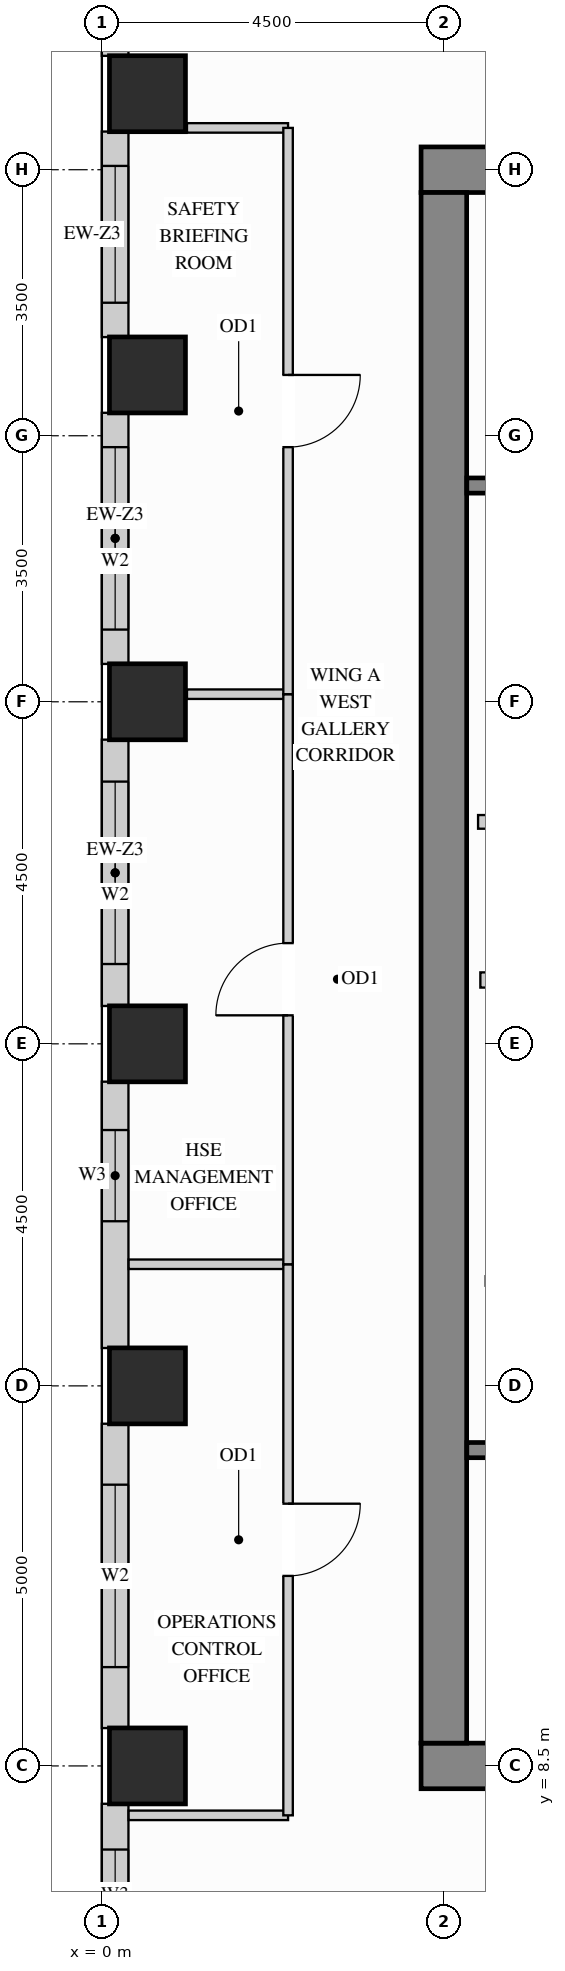
"""IFC4 building model, lengths in metres.
Left out: names, types, materials, properties, quantities, classifications, styles, units other than length and angle.
Written with IfcOpenShell. Run it as: python <this file> out.ifc"""

import sys

from ifc_helpers import new_model, si_unit, direction, frame, frame_2d, origin, origin_2d, place, context, subcontext, project, spatial, rectangle, extrude, source, transform, mapped, element, fill, save


model = new_model("IFC4")
c1 = context("Model", 3, precision=1e-05, world=origin(), true_north=direction((0.0, 1.0)))
c2 = subcontext(c1, "Body", "Model", "MODEL_VIEW")
j1 = project(units=[si_unit("LENGTHUNIT", "METRE"), si_unit("PLANEANGLEUNIT", "RADIAN")], contexts=[c1])
p1 = place(None, origin())
s1 = spatial("IfcSite", under=j1, at=p1, CompositionType="ELEMENT")
p2 = place(p1, origin())
s2 = spatial("IfcBuilding", under=s1, at=p2, CompositionType="ELEMENT")
p3 = place(p2, frame((0.0, 0.0, 157.5)))
s3 = spatial("IfcBuildingStorey", under=s2, at=p3, CompositionType="ELEMENT", Elevation=157.5)
m1 = source(origin(), c2, "Body", "SweptSolid", [
    extrude(rectangle(XDim=1.0, YDim=1.0, at=origin_2d()), origin(), (0.0, 0.0, 1.0), 3.4),
])
for number, where, z_axis, x_axis in (
    (1, (0.6, 13.5, 0.0), (0.0, 0.0, 1.0), (1.0, 0.0, 0.0)),
    (2, (0.6, 18.0, 0.0), (0.0, 0.0, 1.0), (1.0, 0.0, 0.0)),
    (3, (0.6, 22.5, 0.0), (0.0, 0.0, 1.0), (1.0, 0.0, 0.0)),
    (4, (0.6, 26.8, 0.0), (0.0, 0.0, 1.0), (1.0, 0.0, 0.0)),
    (5, (0.6, 30.5, 0.0), (0.0, 0.0, 1.0), (1.0, 0.0, 0.0)),
    (6, (0.6, 8.5, 0.0), (0.0, 0.0, 1.0), (1.0, 0.0, 0.0)),
):
    element("IfcColumn", number, at=place(p3, frame(where, z_axis=z_axis, x_axis=x_axis)), inside=s3, PredefinedType="COLUMN", context=c2, shape_type="MappedRepresentation", body=[
        mapped(m1, transform((0.0, 0.0, 0.0), x_axis=(1.0, 0.0, 0.0), y_axis=(0.0, 1.0, 0.0), z_axis=(0.0, 0.0, 1.0))),
    ])
m2 = source(origin(), c2, "Body", "SweptSolid", [
    extrude(rectangle(XDim=10.6, YDim=0.6, at=frame_2d((5.3, 0.0))), origin(), (0.0, 0.0, 1.0), 3.4),
])
for number, where, z_axis, x_axis in (
    (7, (4.2, 29.5, 0.0), (0.0, 0.0, 1.0), (1.0, 0.0, 0.0)),
    (8, (4.2, 8.5, 0.0), (0.0, 0.0, 1.0), (1.0, 0.0, 0.0)),
):
    element("IfcWall", number, at=place(p3, frame(where, z_axis=z_axis, x_axis=x_axis)), inside=s3, PredefinedType="SHEAR", context=c2, shape_type="MappedRepresentation", body=[
        mapped(m2, transform((0.0, 0.0, 0.0), x_axis=(1.0, 0.0, 0.0), y_axis=(0.0, 1.0, 0.0), z_axis=(0.0, 0.0, 1.0))),
    ])
m3 = source(origin(), c2, "Body", "SweptSolid", [
    extrude(rectangle(XDim=20.4, YDim=0.6, at=frame_2d((10.2, 0.0))), origin(), (0.0, 0.0, 1.0), 3.4),
])
p4 = place(p3, frame((4.5, 8.8, 0.0), z_axis=(0.0, 0.0, 1.0), x_axis=(0.0, 1.0, 0.0)))
e9 = element("IfcWall", 9, at=p4, inside=s3, PredefinedType="SHEAR", context=c2, shape_type="MappedRepresentation", body=[
    mapped(m3, transform((0.0, 0.0, 0.0), x_axis=(1.0, 0.0, 0.0), y_axis=(0.0, 1.0, 0.0), z_axis=(0.0, 0.0, 1.0))),
])
p5 = place(p3, frame((0.175, 34.502, 0.0), z_axis=(0.0, 0.0, 1.0), x_axis=(0.0, -1.0, 0.0)))
e10 = element("IfcWall", 10, at=p5, inside=s3, PredefinedType="SOLIDWALL", context=c2, shape_type="SweptSolid", body=[
    extrude(rectangle(XDim=3.504, YDim=0.35, at=frame_2d((1.752, 0.0))), origin(), (0.0, 0.0, 1.0), 2.612),
])
p6 = place(p5, frame((0.461, 0.0, 0.78)))
e11 = element("IfcOpeningElement", 11, at=p6, cuts=e10, PredefinedType="OPENING", context=c2, shape_type="SweptSolid", body=[
    extrude(rectangle(XDim=1.8, YDim=1.652, at=frame_2d((0.9, 0.826))), frame((0.0, 0.185, 0.0), z_axis=(0.0, -1.0, 0.0), x_axis=(1.0, 0.0, 0.0)), (0.0, 0.0, 1.0), 0.37),
])
p7 = place(p3, frame((0.175, 30.002, 0.0), z_axis=(0.0, 0.0, 1.0), x_axis=(0.0, -1.0, 0.0)))
e12 = element("IfcWall", 12, at=p7, inside=s3, PredefinedType="SOLIDWALL", context=c2, shape_type="SweptSolid", body=[
    extrude(rectangle(XDim=2.704, YDim=0.35, at=frame_2d((1.352, 0.0))), origin(), (0.0, 0.0, 1.0), 2.612),
])
p8 = place(p7, frame((0.452, 0.0, 0.78)))
e13 = element("IfcOpeningElement", 13, at=p8, cuts=e12, PredefinedType="OPENING", context=c2, shape_type="SweptSolid", body=[
    extrude(rectangle(XDim=1.8, YDim=1.652, at=frame_2d((0.9, 0.826))), frame((0.0, 0.185, 0.0), z_axis=(0.0, -1.0, 0.0), x_axis=(1.0, 0.0, 0.0)), (0.0, 0.0, 1.0), 0.37),
])
p9 = place(p3, frame((0.175, 26.302, 0.0), z_axis=(0.0, 0.0, 1.0), x_axis=(0.0, -1.0, 0.0)))
e14 = element("IfcWall", 14, at=p9, inside=s3, PredefinedType="SOLIDWALL", context=c2, shape_type="SweptSolid", body=[
    extrude(rectangle(XDim=3.304, YDim=0.35, at=frame_2d((1.652, 0.0))), origin(), (0.0, 0.0, 1.0), 2.612),
])
p10 = place(p9, frame((0.452, 0.0, 0.78)))
e15 = element("IfcOpeningElement", 15, at=p10, cuts=e14, PredefinedType="OPENING", context=c2, shape_type="SweptSolid", body=[
    extrude(rectangle(XDim=2.4, YDim=1.652, at=frame_2d((1.2, 0.826))), frame((0.0, 0.185, 0.0), z_axis=(0.0, -1.0, 0.0), x_axis=(1.0, 0.0, 0.0)), (0.0, 0.0, 1.0), 0.37),
])
p11 = place(p3, frame((0.175, 22.002, 0.0), z_axis=(0.0, 0.0, 1.0), x_axis=(0.0, -1.0, 0.0)))
e16 = element("IfcWall", 16, at=p11, inside=s3, PredefinedType="SOLIDWALL", context=c2, shape_type="SweptSolid", body=[
    extrude(rectangle(XDim=3.504, YDim=0.35, at=frame_2d((1.752, 0.0))), origin(), (0.0, 0.0, 1.0), 2.612),
])
p12 = place(p11, frame((0.552, 0.0, 0.78)))
e17 = element("IfcOpeningElement", 17, at=p12, cuts=e16, PredefinedType="OPENING", context=c2, shape_type="SweptSolid", body=[
    extrude(rectangle(XDim=2.4, YDim=1.652, at=frame_2d((1.2, 0.826))), frame((0.0, 0.185, 0.0), z_axis=(0.0, -1.0, 0.0), x_axis=(1.0, 0.0, 0.0)), (0.0, 0.0, 1.0), 0.37),
])
p13 = place(p3, frame((0.175, 17.502, 0.0), z_axis=(0.0, 0.0, 1.0), x_axis=(0.0, -1.0, 0.0)))
e18 = element("IfcWall", 18, at=p13, inside=s3, PredefinedType="SOLIDWALL", context=c2, shape_type="SweptSolid", body=[
    extrude(rectangle(XDim=3.504, YDim=0.35, at=frame_2d((1.752, 0.0))), origin(), (0.0, 0.0, 1.0), 2.612),
])
p14 = place(p13, frame((0.636, 0.0, 0.78)))
e19 = element("IfcOpeningElement", 19, at=p14, cuts=e18, PredefinedType="OPENING", context=c2, shape_type="SweptSolid", body=[
    extrude(rectangle(XDim=1.2, YDim=1.652, at=frame_2d((0.6, 0.826))), frame((0.0, 0.185, 0.0), z_axis=(0.0, -1.0, 0.0), x_axis=(1.0, 0.0, 0.0)), (0.0, 0.0, 1.0), 0.37),
])
p15 = place(p3, frame((0.175, 13.002, 0.0), z_axis=(0.0, 0.0, 1.0), x_axis=(0.0, -1.0, 0.0)))
e20 = element("IfcWall", 20, at=p15, inside=s3, PredefinedType="SOLIDWALL", context=c2, shape_type="SweptSolid", body=[
    extrude(rectangle(XDim=4.004, YDim=0.35, at=frame_2d((2.002, 0.0))), origin(), (0.0, 0.0, 1.0), 2.612),
])
p16 = place(p15, frame((0.802, 0.0, 0.78)))
e21 = element("IfcOpeningElement", 21, at=p16, cuts=e20, PredefinedType="OPENING", context=c2, shape_type="SweptSolid", body=[
    extrude(rectangle(XDim=2.4, YDim=1.652, at=frame_2d((1.2, 0.826))), frame((0.0, 0.185, 0.0), z_axis=(0.0, -1.0, 0.0), x_axis=(1.0, 0.0, 0.0)), (0.0, 0.0, 1.0), 0.37),
])
p17 = place(p3, frame((0.175, 8.002, 0.0), z_axis=(0.0, 0.0, 1.0), x_axis=(0.0, -1.0, 0.0)))
e22 = element("IfcWall", 22, at=p17, inside=s3, PredefinedType="SOLIDWALL", context=c2, shape_type="SweptSolid", body=[
    extrude(rectangle(XDim=4.004, YDim=0.35, at=frame_2d((2.002, 0.0))), origin(), (0.0, 0.0, 1.0), 2.612),
])
p18 = place(p17, frame((0.602, 0.0, 0.78)))
e23 = element("IfcOpeningElement", 23, at=p18, cuts=e22, PredefinedType="OPENING", context=c2, shape_type="SweptSolid", body=[
    extrude(rectangle(XDim=1.2, YDim=1.652, at=frame_2d((0.6, 0.826))), frame((0.0, 0.185, 0.0), z_axis=(0.0, -1.0, 0.0), x_axis=(1.0, 0.0, 0.0)), (0.0, 0.0, 1.0), 0.37),
])
m4 = source(origin(), c2, "Body", "SweptSolid", [
    extrude(rectangle(XDim=2.2, YDim=0.18, at=frame_2d((1.1, 0.0))), origin(), (0.0, 0.0, 1.0), 3.385),
])
p19 = place(p3, frame((4.95, 20.92, 0.0), z_axis=(0.0, 0.0, 1.0), x_axis=(1.0, 0.0, 0.0)))
e24 = element("IfcWall", 24, at=p19, inside=s3, PredefinedType="PARTITIONING", context=c2, shape_type="MappedRepresentation", body=[
    mapped(m4, transform((0.0, 0.0, 0.0), x_axis=(1.0, 0.0, 0.0), y_axis=(0.0, 1.0, 0.0), z_axis=(0.0, 0.0, 1.0))),
])
p20 = place(p3, frame((5.05, 14.88, 0.0), z_axis=(0.0, 0.0, 1.0), x_axis=(1.0, 0.0, 0.0)))
e25 = element("IfcWall", 25, at=p20, inside=s3, PredefinedType="PARTITIONING", context=c2, shape_type="SweptSolid", body=[
    extrude(rectangle(XDim=2.35, YDim=0.125, at=frame_2d((1.175, 0.0))), origin(), (0.0, 0.0, 1.0), 3.385),
])
p21 = place(p20, frame((0.7, 0.0, 0.0)))
e26 = element("IfcOpeningElement", 26, at=p21, cuts=e25, PredefinedType="OPENING", context=c2, shape_type="SweptSolid", body=[
    extrude(rectangle(XDim=0.85, YDim=2.1, at=frame_2d((0.425, 1.05))), frame((0.0, 0.073, 0.0), z_axis=(0.0, -1.0, 0.0), x_axis=(1.0, 0.0, 0.0)), (0.0, 0.0, 1.0), 0.145),
])
m5 = source(origin(), c2, "Body", "SweptSolid", [
    extrude(rectangle(XDim=1.33, YDim=0.125, at=frame_2d((0.665, 0.0))), origin(), (0.0, 0.0, 1.0), 3.385),
])
p22 = place(p3, frame((1.12, 30.05, 0.0), z_axis=(0.0, 0.0, 1.0), x_axis=(1.0, 0.0, 0.0)))
e27 = element("IfcWall", 27, at=p22, inside=s3, PredefinedType="PARTITIONING", context=c2, shape_type="MappedRepresentation", body=[
    mapped(m5, transform((0.0, 0.0, 0.0), x_axis=(1.0, 0.0, 0.0), y_axis=(0.0, 1.0, 0.0), z_axis=(0.0, 0.0, 1.0))),
])
m6 = source(origin(), c2, "Body", "SweptSolid", [
    extrude(rectangle(XDim=2.098, YDim=0.125, at=frame_2d((1.049, 0.0))), origin(), (0.0, 0.0, 1.0), 3.385),
])
for number, where, z_axis, x_axis in (
    (28, (0.352, 7.85, 0.0), (0.0, 0.0, 1.0), (1.0, 0.0, 0.0)),
    (29, (0.352, 15.1, 0.0), (0.0, 0.0, 1.0), (1.0, 0.0, 0.0)),
):
    element("IfcWall", number, at=place(p3, frame(where, z_axis=z_axis, x_axis=x_axis)), inside=s3, PredefinedType="PARTITIONING", context=c2, shape_type="MappedRepresentation", body=[
        mapped(m6, transform((0.0, 0.0, 0.0), x_axis=(1.0, 0.0, 0.0), y_axis=(0.0, 1.0, 0.0), z_axis=(0.0, 0.0, 1.0))),
    ])
p23 = place(p3, frame((1.12, 22.6, 0.0), z_axis=(0.0, 0.0, 1.0), x_axis=(1.0, 0.0, 0.0)))
e30 = element("IfcWall", 30, at=p23, inside=s3, PredefinedType="PARTITIONING", context=c2, shape_type="MappedRepresentation", body=[
    mapped(m5, transform((0.0, 0.0, 0.0), x_axis=(1.0, 0.0, 0.0), y_axis=(0.0, 1.0, 0.0), z_axis=(0.0, 0.0, 1.0))),
])
p24 = place(p3, frame((2.45, 7.85, 0.0), z_axis=(0.0, 0.0, 1.0), x_axis=(0.0, 1.0, 0.0)))
e31 = element("IfcWall", 31, at=p24, inside=s3, PredefinedType="PARTITIONING", context=c2, shape_type="SweptSolid", body=[
    extrude(rectangle(XDim=7.25, YDim=0.125, at=frame_2d((3.625, 0.0))), origin(), (0.0, 0.0, 1.0), 3.385),
])
p25 = place(p24, frame((3.15, 0.0, 0.0)))
e32 = element("IfcOpeningElement", 32, at=p25, cuts=e31, PredefinedType="OPENING", context=c2, shape_type="SweptSolid", body=[
    extrude(rectangle(XDim=0.95, YDim=2.15, at=frame_2d((0.475, 1.075))), frame((0.0, 0.073, 0.0), z_axis=(0.0, -1.0, 0.0), x_axis=(1.0, 0.0, 0.0)), (0.0, 0.0, 1.0), 0.145),
])
p26 = place(p3, frame((2.45, 15.1, 0.0), z_axis=(0.0, 0.0, 1.0), x_axis=(0.0, 1.0, 0.0)))
e33 = element("IfcWall", 33, at=p26, inside=s3, PredefinedType="PARTITIONING", context=c2, shape_type="SweptSolid", body=[
    extrude(rectangle(XDim=7.5, YDim=0.125, at=frame_2d((3.75, 0.0))), origin(), (0.0, 0.0, 1.0), 3.385),
])
p27 = place(p26, frame((3.275, 0.0, 0.0)))
e34 = element("IfcOpeningElement", 34, at=p27, cuts=e33, PredefinedType="OPENING", context=c2, shape_type="SweptSolid", body=[
    extrude(rectangle(XDim=0.95, YDim=2.15, at=frame_2d((0.475, 1.075))), frame((0.0, 0.073, 0.0), z_axis=(0.0, -1.0, 0.0), x_axis=(1.0, 0.0, 0.0)), (0.0, 0.0, 1.0), 0.145),
])
p28 = place(p3, frame((2.45, 22.6, 0.0), z_axis=(0.0, 0.0, 1.0), x_axis=(0.0, 1.0, 0.0)))
e35 = element("IfcWall", 35, at=p28, inside=s3, PredefinedType="PARTITIONING", context=c2, shape_type="SweptSolid", body=[
    extrude(rectangle(XDim=7.45, YDim=0.125, at=frame_2d((3.725, 0.0))), origin(), (0.0, 0.0, 1.0), 3.385),
])
p29 = place(p28, frame((3.25, 0.0, 0.0)))
e36 = element("IfcOpeningElement", 36, at=p29, cuts=e35, PredefinedType="OPENING", context=c2, shape_type="SweptSolid", body=[
    extrude(rectangle(XDim=0.95, YDim=2.15, at=frame_2d((0.475, 1.075))), frame((0.0, 0.073, 0.0), z_axis=(0.0, -1.0, 0.0), x_axis=(1.0, 0.0, 0.0)), (0.0, 0.0, 1.0), 0.145),
])
m7 = source(origin(), c2, "Body", "SweptSolid", [
    extrude(rectangle(XDim=2.09, YDim=0.2, at=frame_2d((1.045, 0.0))), origin(), (0.0, 0.0, 1.0), 3.385),
])
p30 = place(p3, frame((4.98, 18.84, 0.0), z_axis=(0.0, 0.0, 1.0), x_axis=(1.0, 0.0, 0.0)))
e37 = element("IfcWall", 37, at=p30, inside=s3, PredefinedType="PARTITIONING", context=c2, shape_type="MappedRepresentation", body=[
    mapped(m7, transform((0.0, 0.0, 0.0), x_axis=(1.0, 0.0, 0.0), y_axis=(0.0, 1.0, 0.0), z_axis=(0.0, 0.0, 1.0))),
])
p31 = place(p3, frame((4.802, 12.655, 0.0), z_axis=(0.0, 0.0, 1.0), x_axis=(1.0, 0.0, 0.0)))
e38 = element("IfcWall", 38, at=p31, inside=s3, PredefinedType="SHEAR", context=c2, shape_type="SweptSolid", body=[
    extrude(rectangle(XDim=7.603, YDim=0.2, at=frame_2d((3.802, 0.0))), origin(), (0.0, 0.0, 1.0), 3.4),
])
p32 = place(p31, frame((0.4, 0.0, 0.0)))
e39 = element("IfcOpeningElement", 39, at=p32, cuts=e38, PredefinedType="OPENING", context=c2, shape_type="SweptSolid", body=[
    extrude(rectangle(XDim=1.1, YDim=2.15, at=frame_2d((0.55, 1.075))), frame((0.0, 0.11, 0.0), z_axis=(0.0, -1.0, 0.0), x_axis=(1.0, 0.0, 0.0)), (0.0, 0.0, 1.0), 0.22),
])
p33 = place(p3, frame((4.802, 25.345, 0.0), z_axis=(0.0, 0.0, 1.0), x_axis=(1.0, 0.0, 0.0)))
e40 = element("IfcWall", 40, at=p33, inside=s3, PredefinedType="SHEAR", context=c2, shape_type="SweptSolid", body=[
    extrude(rectangle(XDim=7.603, YDim=0.2, at=frame_2d((3.802, 0.0))), origin(), (0.0, 0.0, 1.0), 3.4),
])
p34 = place(p33, frame((0.4, 0.0, 0.0)))
e41 = element("IfcOpeningElement", 41, at=p34, cuts=e40, PredefinedType="OPENING", context=c2, shape_type="SweptSolid", body=[
    extrude(rectangle(XDim=1.1, YDim=2.15, at=frame_2d((0.55, 1.075))), frame((0.0, 0.11, 0.0), z_axis=(0.0, -1.0, 0.0), x_axis=(1.0, 0.0, 0.0)), (0.0, 0.0, 1.0), 0.22),
])
m8 = source(origin(), c2, "Body", "SweptSolid", [
    extrude(rectangle(XDim=0.95, YDim=2.15, at=frame_2d((0.475, 1.075))), frame((0.0, 0.025, 0.0), z_axis=(0.0, -1.0, 0.0), x_axis=(1.0, 0.0, 0.0)), (0.0, 0.0, 1.0), 0.05),
])
p35 = place(p25, origin())
e42 = element("IfcDoor", 42, at=p35, inside=s3, OperationType="SINGLE_SWING_RIGHT", PredefinedType="DOOR", context=c2, shape_type="MappedRepresentation", body=[
    mapped(m8, transform((0.0, 0.0, 0.0), x_axis=(1.0, 0.0, 0.0), y_axis=(0.0, 1.0, 0.0), z_axis=(0.0, 0.0, 1.0))),
])
fill(e32, e42)
p36 = place(p27, origin())
e43 = element("IfcDoor", 43, at=p36, inside=s3, OperationType="SINGLE_SWING_LEFT", PredefinedType="DOOR", context=c2, shape_type="MappedRepresentation", body=[
    mapped(m8, transform((0.0, 0.0, 0.0), x_axis=(1.0, 0.0, 0.0), y_axis=(0.0, 1.0, 0.0), z_axis=(0.0, 0.0, 1.0))),
])
fill(e34, e43)
p37 = place(p29, origin())
e44 = element("IfcDoor", 44, at=p37, inside=s3, OperationType="SINGLE_SWING_RIGHT", PredefinedType="DOOR", context=c2, shape_type="MappedRepresentation", body=[
    mapped(m8, transform((0.0, 0.0, 0.0), x_axis=(1.0, 0.0, 0.0), y_axis=(0.0, 1.0, 0.0), z_axis=(0.0, 0.0, 1.0))),
])
fill(e36, e44)
m9 = source(origin(), c2, "Body", "SweptSolid", [
    extrude(rectangle(XDim=1.8, YDim=1.652, at=frame_2d((0.9, 0.826))), frame((0.0, 0.03, 0.0), z_axis=(0.0, -1.0, 0.0), x_axis=(1.0, 0.0, 0.0)), (0.0, 0.0, 1.0), 0.06),
])
p38 = place(p8, origin())
e45 = element("IfcWindow", 45, at=p38, inside=s3, PartitioningType="SINGLE_PANEL", PredefinedType="WINDOW", context=c2, shape_type="MappedRepresentation", body=[
    mapped(m9, transform((0.0, 0.0, 0.0), x_axis=(1.0, 0.0, 0.0), y_axis=(0.0, 1.0, 0.0), z_axis=(0.0, 0.0, 1.0))),
])
fill(e13, e45)
m10 = source(origin(), c2, "Body", "SweptSolid", [
    extrude(rectangle(XDim=2.4, YDim=1.652, at=frame_2d((1.2, 0.826))), frame((0.0, 0.03, 0.0), z_axis=(0.0, -1.0, 0.0), x_axis=(1.0, 0.0, 0.0)), (0.0, 0.0, 1.0), 0.06),
])
p39 = place(p10, origin())
e46 = element("IfcWindow", 46, at=p39, inside=s3, PartitioningType="SINGLE_PANEL", PredefinedType="WINDOW", context=c2, shape_type="MappedRepresentation", body=[
    mapped(m10, transform((0.0, 0.0, 0.0), x_axis=(1.0, 0.0, 0.0), y_axis=(0.0, 1.0, 0.0), z_axis=(0.0, 0.0, 1.0))),
])
fill(e15, e46)
p40 = place(p12, origin())
e47 = element("IfcWindow", 47, at=p40, inside=s3, PartitioningType="SINGLE_PANEL", PredefinedType="WINDOW", context=c2, shape_type="MappedRepresentation", body=[
    mapped(m10, transform((0.0, 0.0, 0.0), x_axis=(1.0, 0.0, 0.0), y_axis=(0.0, 1.0, 0.0), z_axis=(0.0, 0.0, 1.0))),
])
fill(e17, e47)
p41 = place(p16, origin())
e48 = element("IfcWindow", 48, at=p41, inside=s3, PartitioningType="SINGLE_PANEL", PredefinedType="WINDOW", context=c2, shape_type="MappedRepresentation", body=[
    mapped(m10, transform((0.0, 0.0, 0.0), x_axis=(1.0, 0.0, 0.0), y_axis=(0.0, 1.0, 0.0), z_axis=(0.0, 0.0, 1.0))),
])
fill(e21, e48)
m11 = source(origin(), c2, "Body", "SweptSolid", [
    extrude(rectangle(XDim=1.2, YDim=1.652, at=frame_2d((0.6, 0.826))), frame((0.0, 0.03, 0.0), z_axis=(0.0, -1.0, 0.0), x_axis=(1.0, 0.0, 0.0)), (0.0, 0.0, 1.0), 0.06),
])
p42 = place(p14, origin())
e49 = element("IfcWindow", 49, at=p42, inside=s3, PartitioningType="SINGLE_PANEL", PredefinedType="WINDOW", context=c2, shape_type="MappedRepresentation", body=[
    mapped(m11, transform((0.0, 0.0, 0.0), x_axis=(1.0, 0.0, 0.0), y_axis=(0.0, 1.0, 0.0), z_axis=(0.0, 0.0, 1.0))),
])
fill(e19, e49)
p43 = place(p18, origin())
e50 = element("IfcWindow", 50, at=p43, inside=s3, PartitioningType="SINGLE_PANEL", PredefinedType="WINDOW", context=c2, shape_type="MappedRepresentation", body=[
    mapped(m11, transform((0.0, 0.0, 0.0), x_axis=(1.0, 0.0, 0.0), y_axis=(0.0, 1.0, 0.0), z_axis=(0.0, 0.0, 1.0))),
])
fill(e23, e50)
save(model, sys.argv[1])
